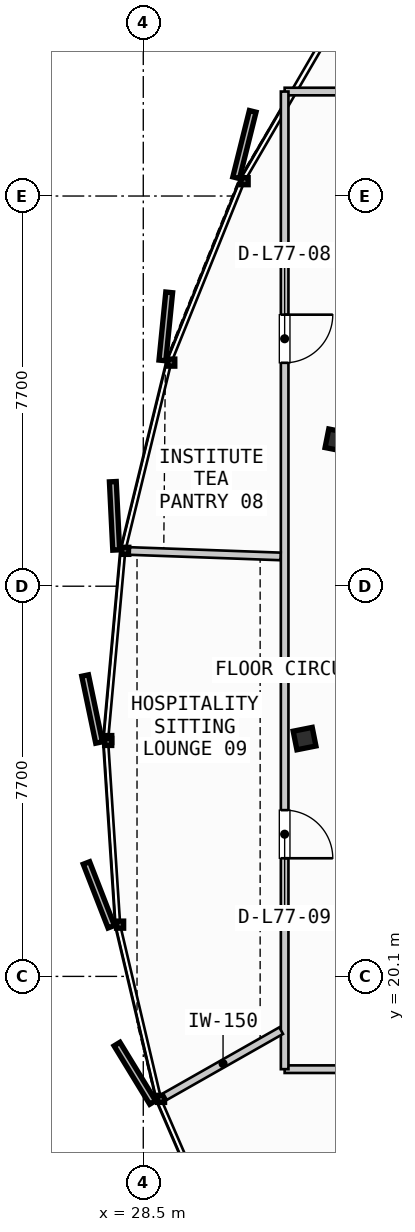
"""IFC4 building model, lengths in metres.
Left out: names, types, materials, properties, quantities, classifications, styles, units other than length and angle.
Written with IfcOpenShell. Run it as: python <this file> out.ifc"""

import sys

from ifc_helpers import new_model, si_unit, direction, frame, frame_2d, origin, origin_2d, place, context, subcontext, project, spatial, rectangle, i_section, extrude, source, transform, mapped, element, fill, save


model = new_model("IFC4")
c1 = context("Model", 3, precision=1e-05, world=origin(), true_north=direction((0.0, 1.0)))
c2 = subcontext(c1, "Body", "Model", "MODEL_VIEW")
j1 = project(units=[si_unit("LENGTHUNIT", "METRE"), si_unit("PLANEANGLEUNIT", "RADIAN")], contexts=[c1])
p1 = place(None, origin())
s1 = spatial("IfcSite", under=j1, at=p1, CompositionType="ELEMENT")
p2 = place(p1, origin())
s2 = spatial("IfcBuilding", under=s1, at=p2, CompositionType="ELEMENT")
p3 = place(p2, frame((0.0, 0.0, 290.5)))
s3 = spatial("IfcBuildingStorey", under=s2, at=p3, CompositionType="ELEMENT", Elevation=290.5)
m1 = source(origin(), c2, "Body", "SweptSolid", [
    extrude(i_section(OverallWidth=0.374, OverallDepth=0.383, WebThickness=0.017, FlangeThickness=0.026, FilletRadius=0.015, at=origin_2d()), origin(), (0.0, 0.0, 1.0), 3.21),
])
for number, where, z_axis, x_axis in (
    (1, (32.312, 30.682, 0.0), (0.0, 0.0, 1.0), (-0.981, 0.195, 0.0)),
    (2, (31.683, 24.793, 0.0), (0.0, 0.0, 1.0), (-0.981, -0.195, 0.0)),
):
    element("IfcColumn", number, at=place(p3, frame(where, z_axis=z_axis, x_axis=x_axis)), inside=s3, PredefinedType="COLUMN", context=c2, shape_type="MappedRepresentation", body=[
        mapped(m1, transform((0.0, 0.0, 0.0), scale=1.0)),
    ])
p4 = place(p3, frame((31.29, 18.269, 0.0), z_axis=(0.0, 0.0, 1.0), x_axis=(1.0, 0.0, 0.0)))
e3 = element("IfcWall", 3, at=p4, inside=s3, PredefinedType="PARTITIONING", context=c2, shape_type="SweptSolid", body=[
    extrude(rectangle(XDim=30.274, YDim=0.15, at=frame_2d((15.137, 0.0))), origin(), (0.0, 0.0, 1.0), 2.315),
])
p5 = place(p4, frame((6.033, 0.0, 0.0)))
e4 = element("IfcOpeningElement", 4, at=p5, cuts=e3, PredefinedType="OPENING", context=c2, shape_type="SweptSolid", body=[
    extrude(rectangle(XDim=0.95, YDim=2.15, at=frame_2d((0.475, 1.075))), frame((0.0, 0.085, 0.0), z_axis=(0.0, -1.0, 0.0), x_axis=(1.0, 0.0, 0.0)), (0.0, 0.0, 1.0), 0.17),
])
p6 = place(p4, frame((19.625, 0.0, 0.0)))
e5 = element("IfcOpeningElement", 5, at=p6, cuts=e3, PredefinedType="OPENING", context=c2, shape_type="SweptSolid", body=[
    extrude(rectangle(XDim=0.95, YDim=2.15, at=frame_2d((0.475, 1.075))), frame((0.0, 0.085, 0.0), z_axis=(0.0, -1.0, 0.0), x_axis=(1.0, 0.0, 0.0)), (0.0, 0.0, 1.0), 0.17),
])
p7 = place(p3, frame((61.564, 37.562, 0.0), z_axis=(0.0, 0.0, 1.0), x_axis=(-1.0, 0.0, 0.0)))
e6 = element("IfcWall", 6, at=p7, inside=s3, PredefinedType="PARTITIONING", context=c2, shape_type="SweptSolid", body=[
    extrude(rectangle(XDim=30.274, YDim=0.15, at=frame_2d((15.137, 0.0))), origin(), (0.0, 0.0, 1.0), 2.315),
])
p8 = place(p7, frame((7.104, 0.0, 0.0)))
e7 = element("IfcOpeningElement", 7, at=p8, cuts=e6, PredefinedType="OPENING", context=c2, shape_type="SweptSolid", body=[
    extrude(rectangle(XDim=0.95, YDim=2.15, at=frame_2d((0.475, 1.075))), frame((0.0, 0.085, 0.0), z_axis=(0.0, -1.0, 0.0), x_axis=(1.0, 0.0, 0.0)), (0.0, 0.0, 1.0), 0.17),
])
p9 = place(p7, frame((20.473, 0.0, 0.0)))
e8 = element("IfcOpeningElement", 8, at=p9, cuts=e6, PredefinedType="OPENING", context=c2, shape_type="SweptSolid", body=[
    extrude(rectangle(XDim=0.95, YDim=2.15, at=frame_2d((0.475, 1.075))), frame((0.0, 0.085, 0.0), z_axis=(0.0, -1.0, 0.0), x_axis=(1.0, 0.0, 0.0)), (0.0, 0.0, 1.0), 0.17),
])
p10 = place(p3, frame((31.29, 37.562, 0.0), z_axis=(0.0, 0.0, 1.0), x_axis=(0.0, -1.0, 0.0)))
e9 = element("IfcWall", 9, at=p10, inside=s3, PredefinedType="PARTITIONING", context=c2, shape_type="SweptSolid", body=[
    extrude(rectangle(XDim=19.293, YDim=0.15, at=frame_2d((9.646, 0.0))), origin(), (0.0, 0.0, 1.0), 2.315),
])
p11 = place(p10, frame((4.403, 0.0, 0.0)))
e10 = element("IfcOpeningElement", 10, at=p11, cuts=e9, PredefinedType="OPENING", context=c2, shape_type="SweptSolid", body=[
    extrude(rectangle(XDim=0.95, YDim=2.15, at=frame_2d((0.475, 1.075))), frame((0.0, 0.085, 0.0), z_axis=(0.0, -1.0, 0.0), x_axis=(1.0, 0.0, 0.0)), (0.0, 0.0, 1.0), 0.17),
])
p12 = place(p10, frame((14.181, 0.0, 0.0)))
e11 = element("IfcOpeningElement", 11, at=p12, cuts=e9, PredefinedType="OPENING", context=c2, shape_type="SweptSolid", body=[
    extrude(rectangle(XDim=0.95, YDim=2.15, at=frame_2d((0.475, 1.075))), frame((0.0, 0.085, 0.0), z_axis=(0.0, -1.0, 0.0), x_axis=(1.0, 0.0, 0.0)), (0.0, 0.0, 1.0), 0.17),
])
p13 = place(p3, frame((31.22, 19.029, 0.0), z_axis=(0.0, 0.0, 1.0), x_axis=(-0.869579502261, -0.493792961925, 0.0)))
e12 = element("IfcWall", 12, at=p13, inside=s3, PredefinedType="PARTITIONING", context=c2, shape_type="SweptSolid", body=[
    extrude(rectangle(XDim=2.636, YDim=0.15, at=frame_2d((1.318, 0.0))), origin(), (0.0, 0.0, 1.0), 2.315),
])
p14 = place(p3, frame((31.21, 28.388, 0.0), z_axis=(0.0, 0.0, 1.0), x_axis=(-0.999351945062, 0.035995692803, 0.0)))
e13 = element("IfcWall", 13, at=p14, inside=s3, PredefinedType="PARTITIONING", context=c2, shape_type="SweptSolid", body=[
    extrude(rectangle(XDim=2.978, YDim=0.15, at=frame_2d((1.489, 0.0))), origin(), (0.0, 0.0, 1.0), 2.315),
])
m2 = source(origin(), c2, "Body", "SweptSolid", [
    extrude(rectangle(XDim=0.95, YDim=2.15, at=frame_2d((0.475, 1.075))), frame((0.0, 0.025, 0.0), z_axis=(0.0, -1.0, 0.0), x_axis=(1.0, 0.0, 0.0)), (0.0, 0.0, 1.0), 0.05),
])
p15 = place(p11, origin())
e14 = element("IfcDoor", 14, at=p15, inside=s3, OperationType="SINGLE_SWING_LEFT", PredefinedType="DOOR", context=c2, shape_type="MappedRepresentation", body=[
    mapped(m2, transform((0.0, 0.0, 0.0), scale=1.0)),
])
fill(e10, e14)
p16 = place(p12, origin())
e15 = element("IfcDoor", 15, at=p16, inside=s3, OperationType="SINGLE_SWING_RIGHT", PredefinedType="DOOR", context=c2, shape_type="MappedRepresentation", body=[
    mapped(m2, transform((0.0, 0.0, 0.0), scale=1.0)),
])
fill(e11, e15)
save(model, sys.argv[1])
